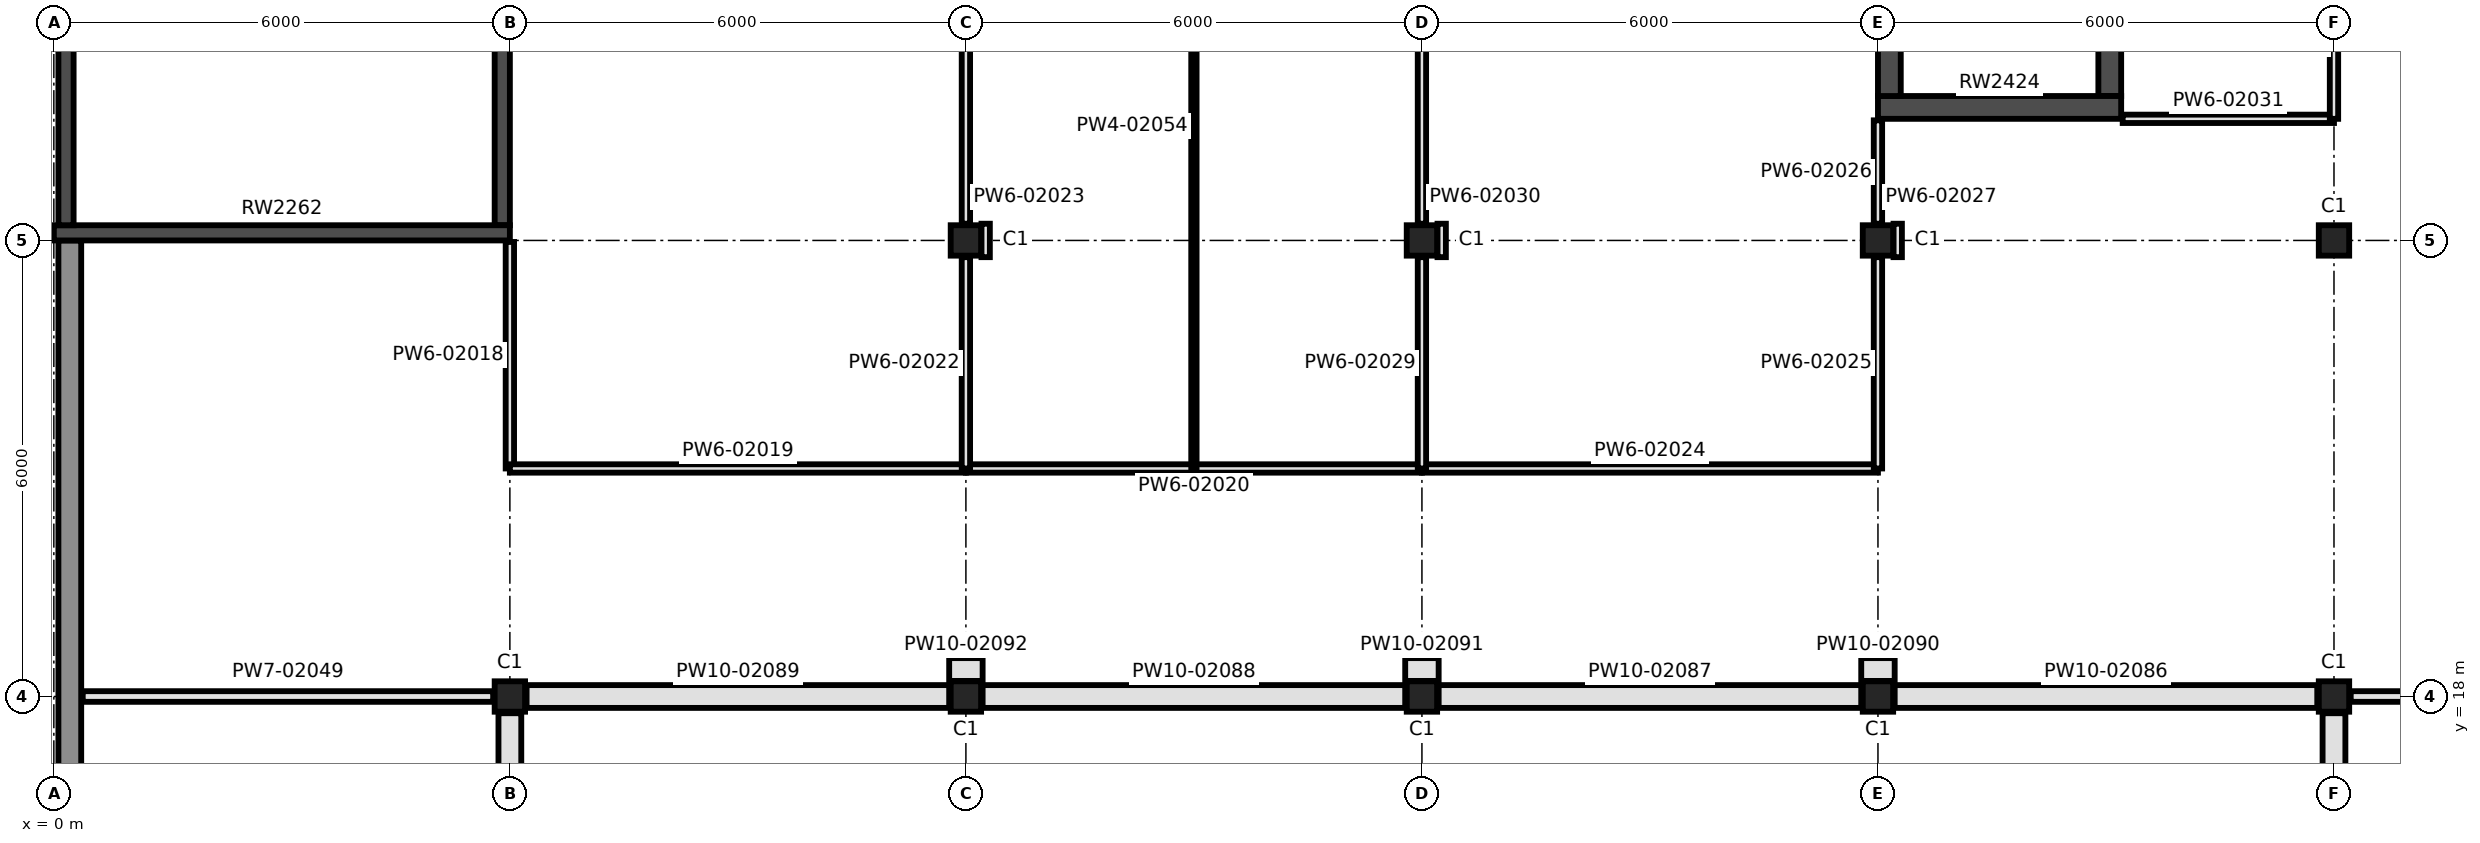
"""IFC4 building model, lengths in metres.
Left out: names, types, materials, properties, quantities, classifications, styles, units other than length and angle.
Written with IfcOpenShell. Run it as: python <this file> out.ifc"""

import sys

from ifc_helpers import new_model, si_unit, direction, frame, frame_2d, origin, origin_2d, place, context, subcontext, project, spatial, rectangle, extrude, element, fill, save


model = new_model("IFC4")
c1 = context("Model", 3, precision=1e-05, world=origin(), true_north=direction((0.0, 1.0)))
c2 = subcontext(c1, "Body", "Model", "MODEL_VIEW")
j1 = project(units=[si_unit("LENGTHUNIT", "METRE"), si_unit("PLANEANGLEUNIT", "RADIAN")], contexts=[c1])
p1 = place(None, origin())
s1 = spatial("IfcSite", under=j1, at=p1, CompositionType="ELEMENT")
p2 = place(p1, origin())
s2 = spatial("IfcBuilding", under=s1, at=p2, CompositionType="ELEMENT")
p3 = place(p2, frame((0.0, 0.0, 12.0)))
s3 = spatial("IfcBuildingStorey", under=s2, at=p3, CompositionType="ELEMENT", Elevation=12.0)
for number, where, z_axis, x_axis in (
    (1, (6.0, 18.0, 0.0), (0.0, 0.0, 1.0), (1.0, 0.0, 0.0)),
    (2, (12.0, 18.0, 0.0), (0.0, 0.0, 1.0), (1.0, 0.0, 0.0)),
    (3, (18.0, 18.0, 0.0), (0.0, 0.0, 1.0), (1.0, 0.0, 0.0)),
    (4, (24.0, 18.0, 0.0), (0.0, 0.0, 1.0), (1.0, 0.0, 0.0)),
    (5, (30.0, 18.0, 0.0), (0.0, 0.0, 1.0), (1.0, 0.0, 0.0)),
    (6, (12.0, 24.0, 0.0), (0.0, 0.0, 1.0), (1.0, 0.0, 0.0)),
    (7, (18.0, 24.0, 0.0), (0.0, 0.0, 1.0), (1.0, 0.0, 0.0)),
    (8, (24.0, 24.0, 0.0), (0.0, 0.0, 1.0), (1.0, 0.0, 0.0)),
    (9, (30.0, 24.0, 0.0), (0.0, 0.0, 1.0), (1.0, 0.0, 0.0)),
):
    element("IfcColumn", number, at=place(p3, frame(where, z_axis=z_axis, x_axis=x_axis)), inside=s3, PredefinedType="COLUMN", context=c2, shape_type="SweptSolid", body=[
        extrude(rectangle(XDim=0.4, YDim=0.4, at=origin_2d()), origin(), (0.0, 0.0, 1.0), 4.5),
    ])
p4 = place(p3, frame((0.0, 24.1, 0.0), z_axis=(0.0, 0.0, 1.0), x_axis=(1.0, 0.0, 0.0)))
e10 = element("IfcWall", 10, at=p4, inside=s3, PredefinedType="SHEAR", context=c2, shape_type="SweptSolid", body=[
    extrude(rectangle(XDim=6.0, YDim=0.2, at=frame_2d((3.0, 0.0))), origin(), (0.0, 0.0, 1.0), 4.5),
])
p5 = place(p4, frame((4.6, 0.0, 0.0)))
e11 = element("IfcOpeningElement", 11, at=p5, cuts=e10, PredefinedType="OPENING", context=c2, shape_type="SweptSolid", body=[
    extrude(rectangle(XDim=1.1, YDim=2.2, at=frame_2d((0.55, 1.1))), frame((0.0, 0.11, 0.0), z_axis=(0.0, -1.0, 0.0), x_axis=(1.0, 0.0, 0.0)), (0.0, 0.0, 1.0), 0.22),
])
p6 = place(p3, frame((0.16, 24.2, 0.0), z_axis=(0.0, 0.0, 1.0), x_axis=(0.0, 1.0, 0.0)))
e12 = element("IfcWall", 12, at=p6, inside=s3, PredefinedType="SHEAR", context=c2, shape_type="SweptSolid", body=[
    extrude(rectangle(XDim=5.6, YDim=0.2, at=frame_2d((2.8, 0.0))), origin(), (0.0, 0.0, 1.0), 4.5),
])
p7 = place(p6, frame((2.55, 0.0, 0.9)))
e13 = element("IfcOpeningElement", 13, at=p7, cuts=e12, PredefinedType="OPENING", context=c2, shape_type="SweptSolid", body=[
    extrude(rectangle(XDim=0.5, YDim=2.1, at=frame_2d((0.25, 1.05))), frame((0.0, 0.11, 0.0), z_axis=(0.0, -1.0, 0.0), x_axis=(1.0, 0.0, 0.0)), (0.0, 0.0, 1.0), 0.22),
])
p8 = place(p3, frame((5.9, 24.2, 0.0), z_axis=(0.0, 0.0, 1.0), x_axis=(0.0, 1.0, 0.0)))
e14 = element("IfcWall", 14, at=p8, inside=s3, PredefinedType="SHEAR", context=c2, shape_type="SweptSolid", body=[
    extrude(rectangle(XDim=5.6, YDim=0.2, at=frame_2d((2.8, 0.0))), origin(), (0.0, 0.0, 1.0), 4.5),
])
p9 = place(p3, frame((24.0, 25.75, 0.0), z_axis=(0.0, 0.0, 1.0), x_axis=(1.0, 0.0, 0.0)))
e15 = element("IfcWall", 15, at=p9, inside=s3, PredefinedType="SHEAR", context=c2, shape_type="SweptSolid", body=[
    extrude(rectangle(XDim=3.2, YDim=0.3, at=frame_2d((1.6, 0.0))), origin(), (0.0, 0.0, 1.0), 4.5),
])
p10 = place(p9, frame((0.4, 0.0, 0.0)))
e16 = element("IfcOpeningElement", 16, at=p10, cuts=e15, PredefinedType="OPENING", context=c2, shape_type="SweptSolid", body=[
    extrude(rectangle(XDim=2.4, YDim=2.4, at=frame_2d((1.2, 1.2))), frame((0.0, 0.16, 0.0), z_axis=(0.0, -1.0, 0.0), x_axis=(1.0, 0.0, 0.0)), (0.0, 0.0, 1.0), 0.32),
])
for number, where, z_axis, x_axis in (
    (17, (24.15, 25.9, 0.0), (0.0, 0.0, 1.0), (0.0, 1.0, 0.0)),
    (18, (27.05, 25.9, 0.0), (0.0, 0.0, 1.0), (0.0, 1.0, 0.0)),
):
    element("IfcWall", number, at=place(p3, frame(where, z_axis=z_axis, x_axis=x_axis)), inside=s3, PredefinedType="SHEAR", context=c2, shape_type="SweptSolid", body=[
        extrude(rectangle(XDim=3.8, YDim=0.3, at=frame_2d((1.9, 0.0))), origin(), (0.0, 0.0, 1.0), 4.5),
    ])
p11 = place(p3, frame((0.21, 6.0, 0.0), z_axis=(0.0, 0.0, 1.0), x_axis=(0.0, 1.0, 0.0)))
e19 = element("IfcWall", 19, at=p11, inside=s3, PredefinedType="SOLIDWALL", context=c2, shape_type="SweptSolid", body=[
    extrude(rectangle(XDim=18.0, YDim=0.3, at=frame_2d((9.0, 0.0))), origin(), (0.0, 0.0, 1.0), 4.5),
])
p12 = place(p3, frame((6.0, 21.0, 0.0), z_axis=(0.0, 0.0, 1.0), x_axis=(0.0, 1.0, 0.0)))
e20 = element("IfcWall", 20, at=p12, inside=s3, PredefinedType="PARTITIONING", context=c2, shape_type="SweptSolid", body=[
    extrude(rectangle(XDim=2.98, YDim=0.11, at=frame_2d((1.49, 0.0))), origin(), (0.0, 0.0, 1.0), 3.9),
])
p13 = place(p3, frame((6.0, 21.0, 0.0), z_axis=(0.0, 0.0, 1.0), x_axis=(1.0, 0.0, 0.0)))
e21 = element("IfcWall", 21, at=p13, inside=s3, PredefinedType="PARTITIONING", context=c2, shape_type="SweptSolid", body=[
    extrude(rectangle(XDim=6.0, YDim=0.11, at=frame_2d((3.0, 0.0))), origin(), (0.0, 0.0, 1.0), 3.9),
])
p14 = place(p13, frame((1.95, 0.0, 0.0)))
e22 = element("IfcOpeningElement", 22, at=p14, cuts=e21, PredefinedType="OPENING", context=c2, shape_type="SweptSolid", body=[
    extrude(rectangle(XDim=2.1, YDim=2.4, at=frame_2d((1.05, 1.2))), frame((0.0, 0.065, 0.0), z_axis=(0.0, -1.0, 0.0), x_axis=(1.0, 0.0, 0.0)), (0.0, 0.0, 1.0), 0.13),
])
p15 = place(p3, frame((12.0, 21.0, 0.0), z_axis=(0.0, 0.0, 1.0), x_axis=(1.0, 0.0, 0.0)))
e23 = element("IfcWall", 23, at=p15, inside=s3, PredefinedType="PARTITIONING", context=c2, shape_type="SweptSolid", body=[
    extrude(rectangle(XDim=6.0, YDim=0.11, at=frame_2d((3.0, 0.0))), origin(), (0.0, 0.0, 1.0), 4.28),
])
p16 = place(p3, frame((12.0, 24.22, 0.0), z_axis=(0.0, 0.0, 1.0), x_axis=(0.0, 1.0, 0.0)))
e24 = element("IfcWall", 24, at=p16, inside=s3, PredefinedType="PARTITIONING", context=c2, shape_type="SweptSolid", body=[
    extrude(rectangle(XDim=5.535, YDim=0.11, at=frame_2d((2.768, 0.0))), origin(), (0.0, 0.0, 1.0), 4.28),
])
p17 = place(p3, frame((12.0, 21.0, 0.0), z_axis=(0.0, 0.0, 1.0), x_axis=(0.0, 1.0, 0.0)))
e25 = element("IfcWall", 25, at=p17, inside=s3, PredefinedType="PARTITIONING", context=c2, shape_type="SweptSolid", body=[
    extrude(rectangle(XDim=2.78, YDim=0.11, at=frame_2d((1.39, 0.0))), origin(), (0.0, 0.0, 1.0), 4.28),
])
p18 = place(p3, frame((12.26, 23.78, 0.0), z_axis=(0.0, 0.0, 1.0), x_axis=(0.0, 1.0, 0.0)))
e26 = element("IfcWall", 26, at=p18, inside=s3, PredefinedType="PARTITIONING", context=c2, shape_type="SweptSolid", body=[
    extrude(rectangle(XDim=0.44, YDim=0.11, at=frame_2d((0.22, 0.0))), origin(), (0.0, 0.0, 1.0), 4.28),
])
p19 = place(p3, frame((18.0, 21.0, 0.0), z_axis=(0.0, 0.0, 1.0), x_axis=(1.0, 0.0, 0.0)))
e27 = element("IfcWall", 27, at=p19, inside=s3, PredefinedType="PARTITIONING", context=c2, shape_type="SweptSolid", body=[
    extrude(rectangle(XDim=6.0, YDim=0.11, at=frame_2d((3.0, 0.0))), origin(), (0.0, 0.0, 1.0), 4.28),
])
p20 = place(p19, frame((2.25, 0.0, 0.0)))
e28 = element("IfcOpeningElement", 28, at=p20, cuts=e27, PredefinedType="OPENING", context=c2, shape_type="SweptSolid", body=[
    extrude(rectangle(XDim=1.5, YDim=2.1, at=frame_2d((0.75, 1.05))), frame((0.0, 0.065, 0.0), z_axis=(0.0, -1.0, 0.0), x_axis=(1.0, 0.0, 0.0)), (0.0, 0.0, 1.0), 0.13),
])
p21 = place(p3, frame((24.0, 21.0, 0.0), z_axis=(0.0, 0.0, 1.0), x_axis=(0.0, 1.0, 0.0)))
e29 = element("IfcWall", 29, at=p21, inside=s3, PredefinedType="PARTITIONING", context=c2, shape_type="SweptSolid", body=[
    extrude(rectangle(XDim=2.78, YDim=0.11, at=frame_2d((1.39, 0.0))), origin(), (0.0, 0.0, 1.0), 4.28),
])
p22 = place(p3, frame((24.0, 24.22, 0.0), z_axis=(0.0, 0.0, 1.0), x_axis=(0.0, 1.0, 0.0)))
e30 = element("IfcWall", 30, at=p22, inside=s3, PredefinedType="PARTITIONING", context=c2, shape_type="SweptSolid", body=[
    extrude(rectangle(XDim=1.36, YDim=0.11, at=frame_2d((0.68, 0.0))), origin(), (0.0, 0.0, 1.0), 4.28),
])
p23 = place(p3, frame((24.26, 23.78, 0.0), z_axis=(0.0, 0.0, 1.0), x_axis=(0.0, 1.0, 0.0)))
e31 = element("IfcWall", 31, at=p23, inside=s3, PredefinedType="PARTITIONING", context=c2, shape_type="SweptSolid", body=[
    extrude(rectangle(XDim=0.44, YDim=0.11, at=frame_2d((0.22, 0.0))), origin(), (0.0, 0.0, 1.0), 4.28),
])
p24 = place(p3, frame((18.0, 24.22, 0.0), z_axis=(0.0, 0.0, 1.0), x_axis=(0.0, 1.0, 0.0)))
e32 = element("IfcWall", 32, at=p24, inside=s3, PredefinedType="PARTITIONING", context=c2, shape_type="SweptSolid", body=[
    extrude(rectangle(XDim=5.76, YDim=0.11, at=frame_2d((2.88, 0.0))), origin(), (0.0, 0.0, 1.0), 3.55),
])
p25 = place(p3, frame((18.0, 21.0, 0.0), z_axis=(0.0, 0.0, 1.0), x_axis=(0.0, 1.0, 0.0)))
e33 = element("IfcWall", 33, at=p25, inside=s3, PredefinedType="PARTITIONING", context=c2, shape_type="SweptSolid", body=[
    extrude(rectangle(XDim=2.78, YDim=0.11, at=frame_2d((1.39, 0.0))), origin(), (0.0, 0.0, 1.0), 4.28),
])
p26 = place(p3, frame((18.26, 23.78, 0.0), z_axis=(0.0, 0.0, 1.0), x_axis=(0.0, 1.0, 0.0)))
e34 = element("IfcWall", 34, at=p26, inside=s3, PredefinedType="PARTITIONING", context=c2, shape_type="SweptSolid", body=[
    extrude(rectangle(XDim=0.44, YDim=0.11, at=frame_2d((0.22, 0.0))), origin(), (0.0, 0.0, 1.0), 4.28),
])
p27 = place(p3, frame((27.22, 25.6, 0.0), z_axis=(0.0, 0.0, 1.0), x_axis=(1.0, 0.0, 0.0)))
e35 = element("IfcWall", 35, at=p27, inside=s3, PredefinedType="PARTITIONING", context=c2, shape_type="SweptSolid", body=[
    extrude(rectangle(XDim=2.78, YDim=0.11, at=frame_2d((1.39, 0.0))), origin(), (0.0, 0.0, 1.0), 4.28),
])
p28 = place(p27, frame((1.03, 0.0, 0.0)))
e36 = element("IfcOpeningElement", 36, at=p28, cuts=e35, PredefinedType="OPENING", context=c2, shape_type="SweptSolid", body=[
    extrude(rectangle(XDim=0.75, YDim=2.04, at=frame_2d((0.375, 1.02))), frame((0.0, 0.065, 0.0), z_axis=(0.0, -1.0, 0.0), x_axis=(1.0, 0.0, 0.0)), (0.0, 0.0, 1.0), 0.13),
])
p29 = place(p3, frame((30.0, 25.6, 0.0), z_axis=(0.0, 0.0, 1.0), x_axis=(0.0, 1.0, 0.0)))
e37 = element("IfcWall", 37, at=p29, inside=s3, PredefinedType="PARTITIONING", context=c2, shape_type="SweptSolid", body=[
    extrude(rectangle(XDim=1.98, YDim=0.11, at=frame_2d((0.99, 0.0))), origin(), (0.0, 0.0, 1.0), 4.28),
])
p30 = place(p3, frame((0.38, 18.0, 0.0), z_axis=(0.0, 0.0, 1.0), x_axis=(1.0, 0.0, 0.0)))
e38 = element("IfcWall", 38, at=p30, inside=s3, PredefinedType="PARTITIONING", context=c2, shape_type="SweptSolid", body=[
    extrude(rectangle(XDim=5.4, YDim=0.14, at=frame_2d((2.7, 0.0))), origin(), (0.0, 0.0, 1.0), 4.28),
])
p31 = place(p30, frame((1.67, 0.0, 0.0)))
e39 = element("IfcOpeningElement", 39, at=p31, cuts=e38, PredefinedType="OPENING", context=c2, shape_type="SweptSolid", body=[
    extrude(rectangle(XDim=1.8, YDim=2.1, at=frame_2d((0.9, 1.05))), frame((0.0, 0.08, 0.0), z_axis=(0.0, -1.0, 0.0), x_axis=(1.0, 0.0, 0.0)), (0.0, 0.0, 1.0), 0.16),
])
p32 = place(p3, frame((30.22, 18.0, 0.0), z_axis=(0.0, 0.0, 1.0), x_axis=(1.0, 0.0, 0.0)))
e40 = element("IfcWall", 40, at=p32, inside=s3, PredefinedType="PARTITIONING", context=c2, shape_type="SweptSolid", body=[
    extrude(rectangle(XDim=5.56, YDim=0.14, at=frame_2d((2.78, 0.0))), origin(), (0.0, 0.0, 1.0), 3.9),
])
p33 = place(p32, frame((0.33, 0.0, 0.0)))
e41 = element("IfcOpeningElement", 41, at=p33, cuts=e40, PredefinedType="OPENING", context=c2, shape_type="SweptSolid", body=[
    extrude(rectangle(XDim=1.8, YDim=2.1, at=frame_2d((0.9, 1.05))), frame((0.0, 0.08, 0.0), z_axis=(0.0, -1.0, 0.0), x_axis=(1.0, 0.0, 0.0)), (0.0, 0.0, 1.0), 0.16),
])
p34 = place(p32, frame((3.33, 0.0, 0.0)))
e42 = element("IfcOpeningElement", 42, at=p34, cuts=e40, PredefinedType="OPENING", context=c2, shape_type="SweptSolid", body=[
    extrude(rectangle(XDim=1.8, YDim=2.1, at=frame_2d((0.9, 1.05))), frame((0.0, 0.08, 0.0), z_axis=(0.0, -1.0, 0.0), x_axis=(1.0, 0.0, 0.0)), (0.0, 0.0, 1.0), 0.16),
])
p35 = place(p3, frame((15.0, 21.0, 0.0), z_axis=(0.0, 0.0, 1.0), x_axis=(0.0, 1.0, 0.0)))
e43 = element("IfcWall", 43, at=p35, inside=s3, PredefinedType="PARTITIONING", context=c2, shape_type="SweptSolid", body=[
    extrude(rectangle(XDim=9.0, YDim=0.07, at=frame_2d((4.5, 0.0))), origin(), (0.0, 0.0, 1.0), 3.55),
])
for number, where, z_axis, x_axis in (
    (44, (24.22, 18.0, 0.0), (0.0, 0.0, 1.0), (1.0, 0.0, 0.0)),
    (45, (18.22, 18.0, 0.0), (0.0, 0.0, 1.0), (1.0, 0.0, 0.0)),
    (46, (12.22, 18.0, 0.0), (0.0, 0.0, 1.0), (1.0, 0.0, 0.0)),
    (47, (6.22, 18.0, 0.0), (0.0, 0.0, 1.0), (1.0, 0.0, 0.0)),
):
    element("IfcWall", number, at=place(p3, frame(where, z_axis=z_axis, x_axis=x_axis)), inside=s3, PredefinedType="PARTITIONING", context=c2, shape_type="SweptSolid", body=[
        extrude(rectangle(XDim=5.56, YDim=0.3, at=frame_2d((2.78, 0.0))), origin(), (0.0, 0.0, 1.0), 3.9),
    ])
for number, where, z_axis, x_axis in (
    (48, (23.78, 18.355, 0.0), (0.0, 0.0, 1.0), (1.0, 0.0, 0.0)),
    (49, (17.78, 18.355, 0.0), (0.0, 0.0, 1.0), (1.0, 0.0, 0.0)),
    (50, (11.78, 18.355, 0.0), (0.0, 0.0, 1.0), (1.0, 0.0, 0.0)),
):
    element("IfcWall", number, at=place(p3, frame(where, z_axis=z_axis, x_axis=x_axis)), inside=s3, PredefinedType="PARTITIONING", context=c2, shape_type="SweptSolid", body=[
        extrude(rectangle(XDim=0.44, YDim=0.3, at=frame_2d((0.22, 0.0))), origin(), (0.0, 0.0, 1.0), 4.28),
    ])
for number, where, z_axis, x_axis in (
    (51, (6.0, 12.22, 0.0), (0.0, 0.0, 1.0), (0.0, 1.0, 0.0)),
    (52, (30.0, 12.22, 0.0), (0.0, 0.0, 1.0), (0.0, 1.0, 0.0)),
):
    element("IfcWall", number, at=place(p3, frame(where, z_axis=z_axis, x_axis=x_axis)), inside=s3, PredefinedType="PARTITIONING", context=c2, shape_type="SweptSolid", body=[
        extrude(rectangle(XDim=5.56, YDim=0.3, at=frame_2d((2.78, 0.0))), origin(), (0.0, 0.0, 1.0), 3.9),
    ])
p36 = place(p14, origin())
e53 = element("IfcDoor", 53, at=p36, inside=s3, OperationType="DOUBLE_DOOR_SINGLE_SWING", PredefinedType="DOOR", context=c2, shape_type="SweptSolid", body=[
    extrude(rectangle(XDim=2.1, YDim=2.4, at=frame_2d((1.05, 1.2))), frame((0.0, 0.025, 0.0), z_axis=(0.0, -1.0, 0.0), x_axis=(1.0, 0.0, 0.0)), (0.0, 0.0, 1.0), 0.05),
])
fill(e22, e53)
p37 = place(p20, origin())
e54 = element("IfcDoor", 54, at=p37, inside=s3, OperationType="DOUBLE_DOOR_SINGLE_SWING", PredefinedType="DOOR", context=c2, shape_type="SweptSolid", body=[
    extrude(rectangle(XDim=1.5, YDim=2.1, at=frame_2d((0.75, 1.05))), frame((0.0, 0.025, 0.0), z_axis=(0.0, -1.0, 0.0), x_axis=(1.0, 0.0, 0.0)), (0.0, 0.0, 1.0), 0.05),
])
fill(e28, e54)
p38 = place(p5, origin())
e55 = element("IfcDoor", 55, at=p38, inside=s3, OperationType="SINGLE_SWING_LEFT", PredefinedType="DOOR", context=c2, shape_type="SweptSolid", body=[
    extrude(rectangle(XDim=1.1, YDim=2.2, at=frame_2d((0.55, 1.1))), frame((0.0, 0.025, 0.0), z_axis=(0.0, -1.0, 0.0), x_axis=(1.0, 0.0, 0.0)), (0.0, 0.0, 1.0), 0.05),
])
fill(e11, e55)
p39 = place(p28, origin())
e56 = element("IfcDoor", 56, at=p39, inside=s3, OperationType="SINGLE_SWING_LEFT", PredefinedType="DOOR", context=c2, shape_type="SweptSolid", body=[
    extrude(rectangle(XDim=0.75, YDim=2.04, at=frame_2d((0.375, 1.02))), frame((0.0, 0.025, 0.0), z_axis=(0.0, -1.0, 0.0), x_axis=(1.0, 0.0, 0.0)), (0.0, 0.0, 1.0), 0.05),
])
fill(e36, e56)
p40 = place(p31, frame((1.8, 0.0, 0.0), z_axis=(0.0, 0.0, 1.0), x_axis=(-1.0, 0.0, 0.0)))
e57 = element("IfcDoor", 57, at=p40, inside=s3, OperationType="DOUBLE_DOOR_SINGLE_SWING", PredefinedType="DOOR", context=c2, shape_type="SweptSolid", body=[
    extrude(rectangle(XDim=1.8, YDim=2.1, at=frame_2d((0.9, 1.05))), frame((0.0, 0.025, 0.0), z_axis=(0.0, -1.0, 0.0), x_axis=(1.0, 0.0, 0.0)), (0.0, 0.0, 1.0), 0.05),
])
fill(e39, e57)
p41 = place(p33, origin())
e58 = element("IfcDoor", 58, at=p41, inside=s3, OperationType="DOUBLE_DOOR_SINGLE_SWING", PredefinedType="DOOR", context=c2, shape_type="SweptSolid", body=[
    extrude(rectangle(XDim=1.8, YDim=2.1, at=frame_2d((0.9, 1.05))), frame((0.0, 0.025, 0.0), z_axis=(0.0, -1.0, 0.0), x_axis=(1.0, 0.0, 0.0)), (0.0, 0.0, 1.0), 0.05),
])
fill(e41, e58)
p42 = place(p10, origin())
e59 = element("IfcDoor", 59, at=p42, inside=s3, OperationType="DOUBLE_DOOR_SLIDING", PredefinedType="DOOR", context=c2, shape_type="SweptSolid", body=[
    extrude(rectangle(XDim=2.4, YDim=2.4, at=frame_2d((1.2, 1.2))), frame((0.0, 0.025, 0.0), z_axis=(0.0, -1.0, 0.0), x_axis=(1.0, 0.0, 0.0)), (0.0, 0.0, 1.0), 0.05),
])
fill(e16, e59)
save(model, sys.argv[1])
